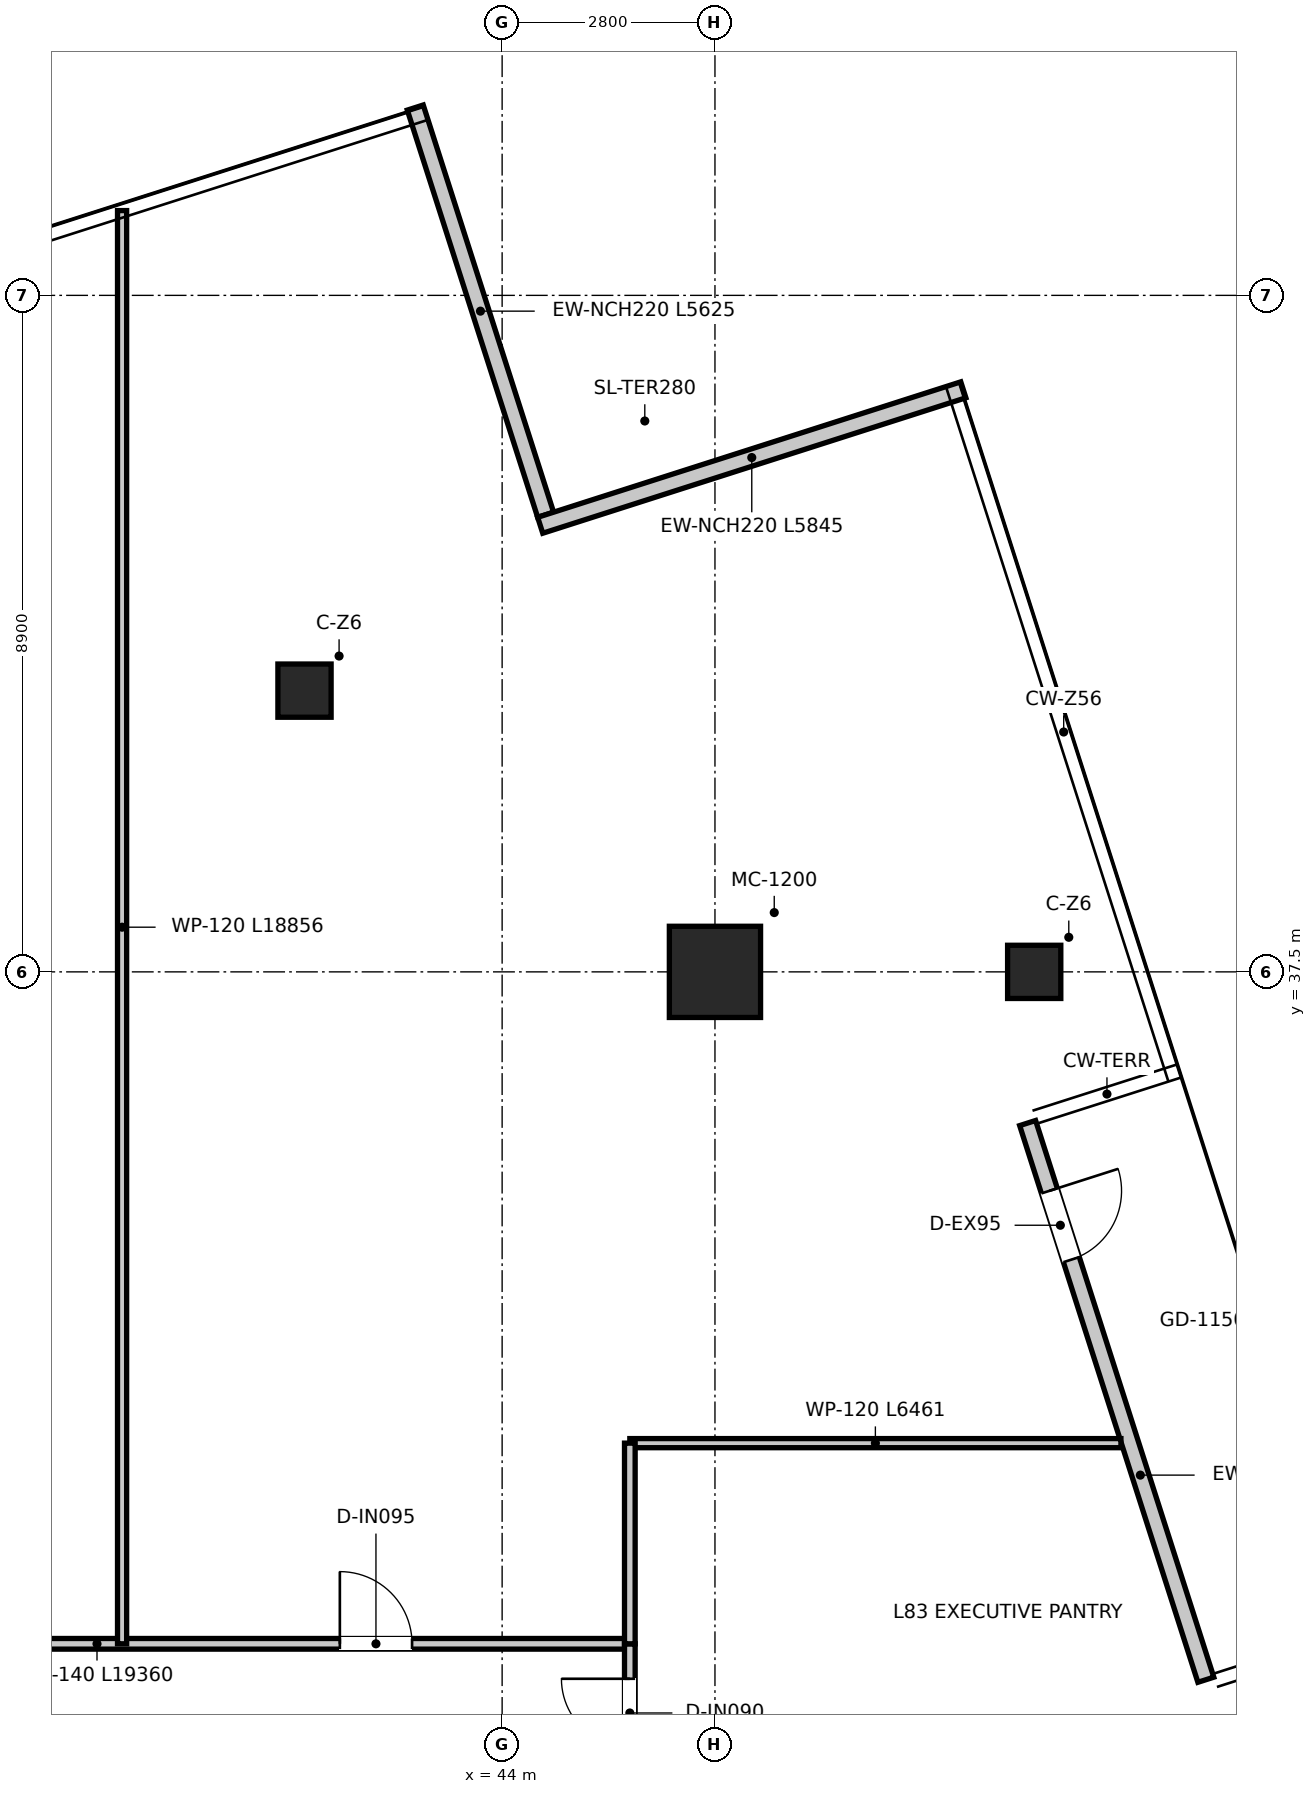
"""IFC4 building model, lengths in metres.
Left out: names, types, materials, properties, quantities, classifications, styles, units other than length and angle.
Written with IfcOpenShell. Run it as: python <this file> out.ifc"""

import sys

from ifc_helpers import new_model, si_unit, direction, frame, frame_2d, origin, origin_2d, place, context, subcontext, project, spatial, rectangle, extrude, source, transform, mapped, element, fill, save


model = new_model("IFC4")
c1 = context("Model", 3, precision=1e-05, world=origin(), true_north=direction((0.0, 1.0)))
c2 = subcontext(c1, "Body", "Model", "MODEL_VIEW")
j1 = project(units=[si_unit("LENGTHUNIT", "METRE"), si_unit("PLANEANGLEUNIT", "RADIAN")], contexts=[c1])
p1 = place(None, origin())
s1 = spatial("IfcSite", under=j1, at=p1, CompositionType="ELEMENT")
p2 = place(p1, origin())
s2 = spatial("IfcBuilding", under=s1, at=p2, CompositionType="ELEMENT")
p3 = place(p2, frame((0.0, 0.0, 339.55)))
s3 = spatial("IfcBuildingStorey", under=s2, at=p3, CompositionType="ELEMENT", Elevation=339.55)
m1 = source(origin(), c2, "Body", "SweptSolid", [
    extrude(rectangle(XDim=1.2, YDim=1.2, at=origin_2d()), origin(), (0.0, 0.0, 1.0), 3.95),
])
p4 = place(p3, frame((46.8, 37.5, 0.0), z_axis=(0.0, 0.0, 1.0), x_axis=(1.0, 0.0, 0.0)))
e1 = element("IfcColumn", 1, at=p4, inside=s3, PredefinedType="USERDEFINED", context=c2, shape_type="MappedRepresentation", body=[
    mapped(m1, transform((0.0, 0.0, 0.0), x_axis=(1.0, 0.0, 0.0), y_axis=(0.0, 1.0, 0.0), z_axis=(0.0, 0.0, 1.0), scale=1.0)),
])
m2 = source(origin(), c2, "Body", "SweptSolid", [
    extrude(rectangle(XDim=0.7, YDim=0.7, at=origin_2d()), origin(), (0.0, 0.0, 1.0), 3.95),
])
for number, where, z_axis, x_axis in (
    (2, (41.4, 41.2, 0.0), (0.0, 0.0, 1.0), (1.0, 0.0, 0.0)),
    (3, (51.0, 37.5, 0.0), (0.0, 0.0, 1.0), (1.0, 0.0, 0.0)),
):
    element("IfcColumn", number, at=place(p3, frame(where, z_axis=z_axis, x_axis=x_axis)), inside=s3, PredefinedType="COLUMN", context=c2, shape_type="MappedRepresentation", body=[
        mapped(m2, transform((0.0, 0.0, 0.0), x_axis=(1.0, 0.0, 0.0), y_axis=(0.0, 1.0, 0.0), z_axis=(0.0, 0.0, 1.0), scale=1.0)),
    ])
p5 = place(p3, frame((44.572, 43.514, 0.0), z_axis=(0.0, 0.0, 1.0), x_axis=(-0.304903286447, 0.952383318792, 0.0)))
e4 = element("IfcWall", 4, at=p5, inside=s3, PredefinedType="ELEMENTEDWALL", context=c2, shape_type="SweptSolid", body=[
    extrude(rectangle(XDim=5.625, YDim=0.22, at=frame_2d((2.812, 0.0))), origin(), (0.0, 0.0, 1.0), 3.67),
])
p6 = place(p3, frame((50.914, 35.511, 0.0), z_axis=(0.0, 0.0, 1.0), x_axis=(0.304842539612, -0.952402764613, 0.0)))
e5 = element("IfcWall", 5, at=p6, inside=s3, PredefinedType="ELEMENTEDWALL", context=c2, shape_type="SweptSolid", body=[
    extrude(rectangle(XDim=7.69, YDim=0.22, at=frame_2d((3.845, 0.0))), origin(), (0.0, 0.0, 1.0), 3.38),
])
p7 = place(p6, frame((0.937, 0.0, 0.0)))
e6 = element("IfcOpeningElement", 6, at=p7, cuts=e5, PredefinedType="OPENING", context=c2, shape_type="SweptSolid", body=[
    extrude(rectangle(XDim=0.95, YDim=2.1, at=frame_2d((0.475, 1.05))), frame((0.0, 0.12, 0.0), z_axis=(0.0, -1.0, 0.0), x_axis=(1.0, 0.0, 0.0)), (0.0, 0.0, 1.0), 0.24),
])
p8 = place(p3, frame((50.068, 45.157, 0.0), z_axis=(0.0, 0.0, 1.0), x_axis=(-0.952391647481, -0.304877270074, 0.0)))
e7 = element("IfcWall", 7, at=p8, inside=s3, PredefinedType="ELEMENTEDWALL", context=c2, shape_type="SweptSolid", body=[
    extrude(rectangle(XDim=5.845, YDim=0.22, at=frame_2d((2.922, 0.0))), origin(), (0.0, 0.0, 1.0), 3.67),
])
p9 = place(p3, frame((26.32, 28.66, 0.0), z_axis=(0.0, 0.0, 1.0), x_axis=(1.0, 0.0, 0.0)))
e8 = element("IfcWall", 8, at=p9, inside=s3, PredefinedType="PARTITIONING", context=c2, shape_type="SweptSolid", body=[
    extrude(rectangle(XDim=19.36, YDim=0.14, at=frame_2d((9.68, 0.0))), origin(), (0.0, 0.0, 1.0), 3.18),
])
p10 = place(p9, frame((1.865, 0.0, 0.0)))
e9 = element("IfcOpeningElement", 9, at=p10, cuts=e8, PredefinedType="OPENING", context=c2, shape_type="SweptSolid", body=[
    extrude(rectangle(XDim=0.95, YDim=2.1, at=frame_2d((0.475, 1.05))), frame((0.0, 0.08, 0.0), z_axis=(0.0, -1.0, 0.0), x_axis=(1.0, 0.0, 0.0)), (0.0, 0.0, 1.0), 0.16),
])
p11 = place(p9, frame((8.205, 0.0, 0.0)))
e10 = element("IfcOpeningElement", 10, at=p11, cuts=e8, PredefinedType="OPENING", context=c2, shape_type="SweptSolid", body=[
    extrude(rectangle(XDim=0.95, YDim=2.1, at=frame_2d((0.475, 1.05))), frame((0.0, 0.08, 0.0), z_axis=(0.0, -1.0, 0.0), x_axis=(1.0, 0.0, 0.0)), (0.0, 0.0, 1.0), 0.16),
])
p12 = place(p9, frame((15.545, 0.0, 0.0)))
e11 = element("IfcOpeningElement", 11, at=p12, cuts=e8, PredefinedType="OPENING", context=c2, shape_type="SweptSolid", body=[
    extrude(rectangle(XDim=0.95, YDim=2.1, at=frame_2d((0.475, 1.05))), frame((0.0, 0.08, 0.0), z_axis=(0.0, -1.0, 0.0), x_axis=(1.0, 0.0, 0.0)), (0.0, 0.0, 1.0), 0.16),
])
p13 = place(p3, frame((45.68, 13.0, 0.0), z_axis=(0.0, 0.0, 1.0), x_axis=(0.0, 1.0, 0.0)))
e12 = element("IfcWall", 12, at=p13, inside=s3, PredefinedType="PARTITIONING", context=c2, shape_type="SweptSolid", body=[
    extrude(rectangle(XDim=15.66, YDim=0.14, at=frame_2d((7.83, 0.0))), origin(), (0.0, 0.0, 1.0), 3.13),
])
p14 = place(p13, frame((14.3, 0.0, 0.0)))
e13 = element("IfcOpeningElement", 13, at=p14, cuts=e12, PredefinedType="OPENING", context=c2, shape_type="SweptSolid", body=[
    extrude(rectangle(XDim=0.9, YDim=2.1, at=frame_2d((0.45, 1.05))), frame((0.0, 0.08, 0.0), z_axis=(0.0, -1.0, 0.0), x_axis=(1.0, 0.0, 0.0)), (0.0, 0.0, 1.0), 0.16),
])
p15 = place(p13, frame((4.9, 0.0, 0.0)))
e14 = element("IfcOpeningElement", 14, at=p15, cuts=e12, PredefinedType="OPENING", context=c2, shape_type="SweptSolid", body=[
    extrude(rectangle(XDim=0.9, YDim=2.1, at=frame_2d((0.45, 1.05))), frame((0.0, 0.08, 0.0), z_axis=(0.0, -1.0, 0.0), x_axis=(1.0, 0.0, 0.0)), (0.0, 0.0, 1.0), 0.16),
])
p16 = place(p13, frame((8.25, 0.0, 0.0)))
e15 = element("IfcOpeningElement", 15, at=p16, cuts=e12, PredefinedType="OPENING", context=c2, shape_type="SweptSolid", body=[
    extrude(rectangle(XDim=0.9, YDim=2.1, at=frame_2d((0.45, 1.05))), frame((0.0, 0.08, 0.0), z_axis=(0.0, -1.0, 0.0), x_axis=(1.0, 0.0, 0.0)), (0.0, 0.0, 1.0), 0.16),
])
p17 = place(p13, frame((12.06, 0.0, 0.0)))
e16 = element("IfcOpeningElement", 16, at=p17, cuts=e12, PredefinedType="OPENING", context=c2, shape_type="SweptSolid", body=[
    extrude(rectangle(XDim=0.9, YDim=2.1, at=frame_2d((0.45, 1.05))), frame((0.0, 0.08, 0.0), z_axis=(0.0, -1.0, 0.0), x_axis=(1.0, 0.0, 0.0)), (0.0, 0.0, 1.0), 0.16),
])
p18 = place(p3, frame((45.68, 31.3, 0.0), z_axis=(0.0, 0.0, 1.0), x_axis=(1.0, 0.0, 0.0)))
e17 = element("IfcWall", 17, at=p18, inside=s3, PredefinedType="PARTITIONING", context=c2, shape_type="SweptSolid", body=[
    extrude(rectangle(XDim=6.461, YDim=0.12, at=frame_2d((3.23, 0.0))), origin(), (0.0, 0.0, 1.0), 3.13),
])
p19 = place(p3, frame((45.68, 28.66, 0.0), z_axis=(0.0, 0.0, 1.0), x_axis=(0.0, 1.0, 0.0)))
e18 = element("IfcWall", 18, at=p19, inside=s3, PredefinedType="PARTITIONING", context=c2, shape_type="SweptSolid", body=[
    extrude(rectangle(XDim=2.64, YDim=0.14, at=frame_2d((1.32, 0.0))), origin(), (0.0, 0.0, 1.0), 3.43),
])
p20 = place(p3, frame((39.0, 28.66, 0.0), z_axis=(0.0, 0.0, 1.0), x_axis=(0.0, 1.0, 0.0)))
e19 = element("IfcWall", 19, at=p20, inside=s3, PredefinedType="PARTITIONING", context=c2, shape_type="SweptSolid", body=[
    extrude(rectangle(XDim=18.855, YDim=0.12, at=frame_2d((9.428, 0.0))), origin(), (0.0, 0.0, 1.0), 3.13),
])
p21 = place(p14, origin())
e20 = element("IfcDoor", 20, at=p21, inside=s3, OperationType="SINGLE_SWING_RIGHT", PredefinedType="DOOR", context=c2, shape_type="SweptSolid", body=[
    extrude(rectangle(XDim=0.9, YDim=2.1, at=frame_2d((0.45, 1.05))), frame((0.0, 0.025, 0.0), z_axis=(0.0, -1.0, 0.0), x_axis=(1.0, 0.0, 0.0)), (0.0, 0.0, 1.0), 0.05),
])
fill(e13, e20)
p22 = place(p12, origin())
e21 = element("IfcDoor", 21, at=p22, inside=s3, OperationType="SINGLE_SWING_LEFT", PredefinedType="DOOR", context=c2, shape_type="SweptSolid", body=[
    extrude(rectangle(XDim=0.95, YDim=2.1, at=frame_2d((0.475, 1.05))), frame((0.0, 0.025, 0.0), z_axis=(0.0, -1.0, 0.0), x_axis=(1.0, 0.0, 0.0)), (0.0, 0.0, 1.0), 0.05),
])
fill(e11, e21)
p23 = place(p7, origin())
e22 = element("IfcDoor", 22, at=p23, inside=s3, OperationType="SINGLE_SWING_LEFT", PredefinedType="DOOR", context=c2, shape_type="SweptSolid", body=[
    extrude(rectangle(XDim=0.95, YDim=2.1, at=frame_2d((0.475, 1.05))), frame((0.0, 0.025, 0.0), z_axis=(0.0, -1.0, 0.0), x_axis=(1.0, 0.0, 0.0)), (0.0, 0.0, 1.0), 0.05),
])
fill(e6, e22)
save(model, sys.argv[1])
